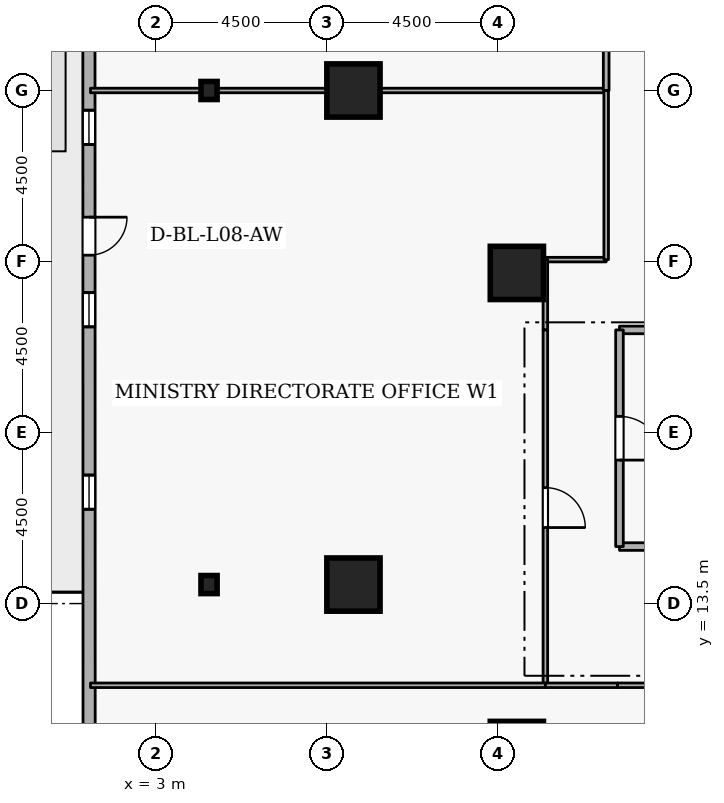
"""IFC4 building model, lengths in metres.
Left out: names, types, materials, properties, quantities, classifications, styles, units other than length and angle.
Written with IfcOpenShell. Run it as: python <this file> out.ifc"""

import sys

from ifc_helpers import new_model, si_unit, direction, frame, frame_2d, origin, origin_2d, place, context, subcontext, project, spatial, rectangle, i_section, extrude, element, fill, save


model = new_model("IFC4")
c1 = context("Model", 3, precision=1e-05, world=origin(), true_north=direction((0.0, 1.0)))
c2 = subcontext(c1, "Body", "Model", "MODEL_VIEW")
j1 = project(units=[si_unit("LENGTHUNIT", "METRE"), si_unit("PLANEANGLEUNIT", "RADIAN")], contexts=[c1])
p1 = place(None, origin())
s1 = spatial("IfcSite", under=j1, at=p1, CompositionType="ELEMENT")
p2 = place(p1, origin())
s2 = spatial("IfcBuilding", under=s1, at=p2, CompositionType="ELEMENT")
p3 = place(p2, frame((0.0, 0.0, 35.1)))
s3 = spatial("IfcBuildingStorey", under=s2, at=p3, CompositionType="ELEMENT", Elevation=35.1)
for number, where, z_axis, x_axis in (
    (1, (12.5, 9.7, 0.0), (0.0, 0.0, 1.0), (1.0, 0.0, 0.0)),
    (2, (8.2, 14.0, 0.0), (0.0, 0.0, 1.0), (1.0, 0.0, 0.0)),
    (3, (8.2, 27.0, 0.0), (0.0, 0.0, 1.0), (1.0, 0.0, 0.0)),
    (4, (12.5, 22.2, 0.0), (0.0, 0.0, 1.0), (1.0, 0.0, 0.0)),
):
    element("IfcColumn", number, at=place(p3, frame(where, z_axis=z_axis, x_axis=x_axis)), inside=s3, PredefinedType="COLUMN", context=c2, shape_type="SweptSolid", body=[
        extrude(rectangle(XDim=1.4, YDim=1.4, at=origin_2d()), origin(), (0.0, 0.0, 1.0), 3.6),
    ])
for number, where, z_axis, x_axis in (
    (5, (4.4, 14.0, 0.0), (0.0, 0.0, 1.0), (1.0, 0.0, 0.0)),
    (6, (4.4, 27.0, 0.0), (0.0, 0.0, 1.0), (1.0, 0.0, 0.0)),
):
    element("IfcColumn", number, at=place(p3, frame(where, z_axis=z_axis, x_axis=x_axis)), inside=s3, PredefinedType="COLUMN", context=c2, shape_type="SweptSolid", body=[
        extrude(i_section(OverallWidth=0.424, OverallDepth=0.475, WebThickness=0.048, FlangeThickness=0.077, FilletRadius=0.015, at=origin_2d()), origin(), (0.0, 0.0, 1.0), 3.6),
    ])
p4 = place(p3, frame((1.235, 42.681, 0.0), z_axis=(0.0, 0.0, 1.0), x_axis=(0.000276554545, -0.999999961759, 0.0)))
e7 = element("IfcWall", 7, at=p4, inside=s3, PredefinedType="STANDARD", context=c2, shape_type="SweptSolid", body=[
    extrude(rectangle(XDim=34.429, YDim=0.32, at=frame_2d((17.214, 0.0))), origin(), (0.0, 0.0, 1.0), 2.7),
])
p5 = place(p4, frame((19.014, 0.0, 0.0)))
e8 = element("IfcOpeningElement", 8, at=p5, cuts=e7, PredefinedType="OPENING", context=c2, shape_type="SweptSolid", body=[
    extrude(rectangle(XDim=1.0, YDim=2.08, at=frame_2d((0.5, 1.04))), frame((0.0, 0.17, 0.0), z_axis=(0.0, -1.0, 0.0), x_axis=(1.0, 0.0, 0.0)), (0.0, 0.0, 1.0), 0.34),
])
p6 = place(p4, frame((1.8, 0.0, 0.72)))
e9 = element("IfcOpeningElement", 9, at=p6, cuts=e7, PredefinedType="OPENING", context=c2, shape_type="SweptSolid", body=[
    extrude(rectangle(XDim=0.9, YDim=1.75, at=frame_2d((0.45, 0.875))), frame((0.0, 0.17, 0.0), z_axis=(0.0, -1.0, 0.0), x_axis=(1.0, 0.0, 0.0)), (0.0, 0.0, 1.0), 0.34),
])
p7 = place(p4, frame((6.6, 0.0, 0.72)))
e10 = element("IfcOpeningElement", 10, at=p7, cuts=e7, PredefinedType="OPENING", context=c2, shape_type="SweptSolid", body=[
    extrude(rectangle(XDim=0.9, YDim=1.75, at=frame_2d((0.45, 0.875))), frame((0.0, 0.17, 0.0), z_axis=(0.0, -1.0, 0.0), x_axis=(1.0, 0.0, 0.0)), (0.0, 0.0, 1.0), 0.34),
])
p8 = place(p4, frame((11.4, 0.0, 0.72)))
e11 = element("IfcOpeningElement", 11, at=p8, cuts=e7, PredefinedType="OPENING", context=c2, shape_type="SweptSolid", body=[
    extrude(rectangle(XDim=0.9, YDim=1.75, at=frame_2d((0.45, 0.875))), frame((0.0, 0.17, 0.0), z_axis=(0.0, -1.0, 0.0), x_axis=(1.0, 0.0, 0.0)), (0.0, 0.0, 1.0), 0.34),
])
p9 = place(p4, frame((16.2, 0.0, 0.72)))
e12 = element("IfcOpeningElement", 12, at=p9, cuts=e7, PredefinedType="OPENING", context=c2, shape_type="SweptSolid", body=[
    extrude(rectangle(XDim=0.9, YDim=1.75, at=frame_2d((0.45, 0.875))), frame((0.0, 0.17, 0.0), z_axis=(0.0, -1.0, 0.0), x_axis=(1.0, 0.0, 0.0)), (0.0, 0.0, 1.0), 0.34),
])
p10 = place(p4, frame((21.0, 0.0, 0.72)))
e13 = element("IfcOpeningElement", 13, at=p10, cuts=e7, PredefinedType="OPENING", context=c2, shape_type="SweptSolid", body=[
    extrude(rectangle(XDim=0.9, YDim=1.75, at=frame_2d((0.45, 0.875))), frame((0.0, 0.17, 0.0), z_axis=(0.0, -1.0, 0.0), x_axis=(1.0, 0.0, 0.0)), (0.0, 0.0, 1.0), 0.34),
])
p11 = place(p4, frame((25.8, 0.0, 0.72)))
e14 = element("IfcOpeningElement", 14, at=p11, cuts=e7, PredefinedType="OPENING", context=c2, shape_type="SweptSolid", body=[
    extrude(rectangle(XDim=0.9, YDim=1.75, at=frame_2d((0.45, 0.875))), frame((0.0, 0.17, 0.0), z_axis=(0.0, -1.0, 0.0), x_axis=(1.0, 0.0, 0.0)), (0.0, 0.0, 1.0), 0.34),
])
for number, where, z_axis, x_axis in (
    (15, (15.2, 15.0, 0.0), (0.0, 0.0, 1.0), (1.0, 0.0, 0.0)),
    (16, (17.7, 20.7, 0.0), (0.0, 0.0, 1.0), (-1.0, 0.0, 0.0)),
):
    element("IfcWall", number, at=place(p3, frame(where, z_axis=z_axis, x_axis=x_axis)), inside=s3, PredefinedType="STANDARD", context=c2, shape_type="SweptSolid", body=[
        extrude(rectangle(XDim=2.5, YDim=0.2, at=frame_2d((1.25, 0.0))), origin(), (0.0, 0.0, 1.0), 3.34),
    ])
p12 = place(p3, frame((15.2, 20.7, 0.0), z_axis=(0.0, 0.0, 1.0), x_axis=(0.0, -1.0, 0.0)))
e17 = element("IfcWall", 17, at=p12, inside=s3, PredefinedType="STANDARD", context=c2, shape_type="SweptSolid", body=[
    extrude(rectangle(XDim=5.7, YDim=0.2, at=frame_2d((2.85, 0.0))), origin(), (0.0, 0.0, 1.0), 3.34),
])
p13 = place(p12, frame((2.275, 0.0, 0.0)))
e18 = element("IfcOpeningElement", 18, at=p13, cuts=e17, PredefinedType="OPENING", context=c2, shape_type="SweptSolid", body=[
    extrude(rectangle(XDim=1.15, YDim=2.1, at=frame_2d((0.575, 1.05))), frame((0.0, 0.11, 0.0), z_axis=(0.0, -1.0, 0.0), x_axis=(1.0, 0.0, 0.0)), (0.0, 0.0, 1.0), 0.22),
])
p14 = place(p3, frame((14.85, 22.55, 0.0), z_axis=(0.0, 0.0, 1.0), x_axis=(-1.0, 0.0, 0.0)))
e19 = element("IfcWall", 19, at=p14, inside=s3, PredefinedType="PARTITIONING", context=c2, shape_type="SweptSolid", body=[
    extrude(rectangle(XDim=1.6, YDim=0.12, at=frame_2d((0.8, 0.0))), origin(), (0.0, 0.0, 1.0), 3.34),
])
p15 = place(p3, frame((13.25, 22.55, 0.0), z_axis=(0.0, 0.0, 1.0), x_axis=(0.0, -1.0, 0.0)))
e20 = element("IfcWall", 20, at=p15, inside=s3, PredefinedType="PARTITIONING", context=c2, shape_type="SweptSolid", body=[
    extrude(rectangle(XDim=1.85, YDim=0.12, at=frame_2d((0.925, 0.0))), origin(), (0.0, 0.0, 1.0), 3.34),
])
p16 = place(p3, frame((13.25, 20.7, 0.0), z_axis=(0.0, 0.0, 1.0), x_axis=(0.0, -1.0, 0.0)))
e21 = element("IfcWall", 21, at=p16, inside=s3, PredefinedType="PARTITIONING", context=c2, shape_type="SweptSolid", body=[
    extrude(rectangle(XDim=9.35, YDim=0.12, at=frame_2d((4.675, 0.0))), origin(), (0.0, 0.0, 1.0), 3.34),
])
p17 = place(p16, frame((4.15, 0.0, 0.0)))
e22 = element("IfcOpeningElement", 22, at=p17, cuts=e21, PredefinedType="OPENING", context=c2, shape_type="SweptSolid", body=[
    extrude(rectangle(XDim=1.05, YDim=2.1, at=frame_2d((0.525, 1.05))), frame((0.0, 0.07, 0.0), z_axis=(0.0, -1.0, 0.0), x_axis=(1.0, 0.0, 0.0)), (0.0, 0.0, 1.0), 0.14),
])
p18 = place(p3, frame((13.25, 11.35, 0.0), z_axis=(0.0, 0.0, 1.0), x_axis=(-1.0, 0.0, 0.0)))
e23 = element("IfcWall", 23, at=p18, inside=s3, PredefinedType="PARTITIONING", context=c2, shape_type="SweptSolid", body=[
    extrude(rectangle(XDim=11.97, YDim=0.12, at=frame_2d((5.985, 0.0))), origin(), (0.0, 0.0, 1.0), 3.34),
])
p19 = place(p3, frame((1.28, 27.0, 0.0), z_axis=(0.0, 0.0, 1.0), x_axis=(1.0, 0.0, 0.0)))
e24 = element("IfcWall", 24, at=p19, inside=s3, PredefinedType="PARTITIONING", context=c2, shape_type="SweptSolid", body=[
    extrude(rectangle(XDim=13.57, YDim=0.12, at=frame_2d((6.785, 0.0))), origin(), (0.0, 0.0, 1.0), 2.878),
])
p20 = place(p3, frame((14.85, 27.0, 0.0), z_axis=(0.0, 0.0, 1.0), x_axis=(0.0, -1.0, 0.0)))
e25 = element("IfcWall", 25, at=p20, inside=s3, PredefinedType="PARTITIONING", context=c2, shape_type="SweptSolid", body=[
    extrude(rectangle(XDim=4.45, YDim=0.12, at=frame_2d((2.225, 0.0))), origin(), (0.0, 0.0, 1.0), 3.34),
])
p21 = place(p3, frame((14.85, 31.45, 0.0), z_axis=(0.0, 0.0, 1.0), x_axis=(0.0, -1.0, 0.0)))
e26 = element("IfcWall", 26, at=p21, inside=s3, PredefinedType="PARTITIONING", context=c2, shape_type="SweptSolid", body=[
    extrude(rectangle(XDim=4.45, YDim=0.15, at=frame_2d((2.225, 0.0))), origin(), (0.0, 0.0, 1.0), 3.34),
])
p22 = place(p21, frame((1.575, 0.0, 0.0)))
e27 = element("IfcOpeningElement", 27, at=p22, cuts=e26, PredefinedType="OPENING", context=c2, shape_type="SweptSolid", body=[
    extrude(rectangle(XDim=1.3, YDim=2.12, at=frame_2d((0.65, 1.06))), frame((0.0, 0.085, 0.0), z_axis=(0.0, -1.0, 0.0), x_axis=(1.0, 0.0, 0.0)), (0.0, 0.0, 1.0), 0.17),
])
p23 = place(p3, frame((13.25, 11.35, 0.0), z_axis=(0.0, 0.0, 1.0), x_axis=(1.0, 0.0, 0.0)))
e28 = element("IfcWall", 28, at=p23, inside=s3, PredefinedType="PARTITIONING", context=c2, shape_type="SweptSolid", body=[
    extrude(rectangle(XDim=1.9, YDim=0.12, at=frame_2d((0.95, 0.0))), origin(), (0.0, 0.0, 1.0), 3.34),
])
p24 = place(p3, frame((15.15, 11.35, 0.0), z_axis=(0.0, 0.0, 1.0), x_axis=(1.0, 0.0, 0.0)))
e29 = element("IfcWall", 29, at=p24, inside=s3, PredefinedType="PARTITIONING", context=c2, shape_type="SweptSolid", body=[
    extrude(rectangle(XDim=10.35, YDim=0.12, at=frame_2d((5.175, 0.0))), origin(), (0.0, 0.0, 1.0), 3.34),
])
p25 = place(p24, frame((4.65, 0.0, 0.0)))
e30 = element("IfcOpeningElement", 30, at=p25, cuts=e29, PredefinedType="OPENING", context=c2, shape_type="SweptSolid", body=[
    extrude(rectangle(XDim=1.05, YDim=2.1, at=frame_2d((0.525, 1.05))), frame((0.0, 0.07, 0.0), z_axis=(0.0, -1.0, 0.0), x_axis=(1.0, 0.0, 0.0)), (0.0, 0.0, 1.0), 0.14),
])
p26 = place(p5, origin())
e31 = element("IfcDoor", 31, at=p26, inside=s3, OperationType="SINGLE_SWING_LEFT", PredefinedType="DOOR", context=c2, shape_type="SweptSolid", body=[
    extrude(rectangle(XDim=1.0, YDim=2.08, at=frame_2d((0.5, 1.04))), frame((0.0, 0.025, 0.0), z_axis=(0.0, -1.0, 0.0), x_axis=(1.0, 0.0, 0.0)), (0.0, 0.0, 1.0), 0.05),
])
fill(e8, e31)
p27 = place(p9, origin())
e32 = element("IfcWindow", 32, at=p27, inside=s3, PartitioningType="SINGLE_PANEL", PredefinedType="WINDOW", context=c2, shape_type="SweptSolid", body=[
    extrude(rectangle(XDim=0.9, YDim=1.75, at=frame_2d((0.45, 0.875))), frame((0.0, 0.03, 0.0), z_axis=(0.0, -1.0, 0.0), x_axis=(1.0, 0.0, 0.0)), (0.0, 0.0, 1.0), 0.06),
])
fill(e12, e32)
p28 = place(p10, origin())
e33 = element("IfcWindow", 33, at=p28, inside=s3, PartitioningType="SINGLE_PANEL", PredefinedType="WINDOW", context=c2, shape_type="SweptSolid", body=[
    extrude(rectangle(XDim=0.9, YDim=1.75, at=frame_2d((0.45, 0.875))), frame((0.0, 0.03, 0.0), z_axis=(0.0, -1.0, 0.0), x_axis=(1.0, 0.0, 0.0)), (0.0, 0.0, 1.0), 0.06),
])
fill(e13, e33)
p29 = place(p11, origin())
e34 = element("IfcWindow", 34, at=p29, inside=s3, PartitioningType="SINGLE_PANEL", PredefinedType="WINDOW", context=c2, shape_type="SweptSolid", body=[
    extrude(rectangle(XDim=0.9, YDim=1.75, at=frame_2d((0.45, 0.875))), frame((0.0, 0.03, 0.0), z_axis=(0.0, -1.0, 0.0), x_axis=(1.0, 0.0, 0.0)), (0.0, 0.0, 1.0), 0.06),
])
fill(e14, e34)
p30 = place(p13, origin())
e35 = element("IfcDoor", 35, at=p30, inside=s3, OperationType="SINGLE_SWING_RIGHT", PredefinedType="DOOR", context=c2, shape_type="SweptSolid", body=[
    extrude(rectangle(XDim=1.15, YDim=2.1, at=frame_2d((0.575, 1.05))), frame((0.0, 0.025, 0.0), z_axis=(0.0, -1.0, 0.0), x_axis=(1.0, 0.0, 0.0)), (0.0, 0.0, 1.0), 0.05),
])
fill(e18, e35)
p31 = place(p17, origin())
e36 = element("IfcDoor", 36, at=p31, inside=s3, OperationType="SINGLE_SWING_RIGHT", PredefinedType="DOOR", context=c2, shape_type="SweptSolid", body=[
    extrude(rectangle(XDim=1.05, YDim=2.1, at=frame_2d((0.525, 1.05))), frame((0.0, 0.025, 0.0), z_axis=(0.0, -1.0, 0.0), x_axis=(1.0, 0.0, 0.0)), (0.0, 0.0, 1.0), 0.05),
])
fill(e22, e36)
save(model, sys.argv[1])
